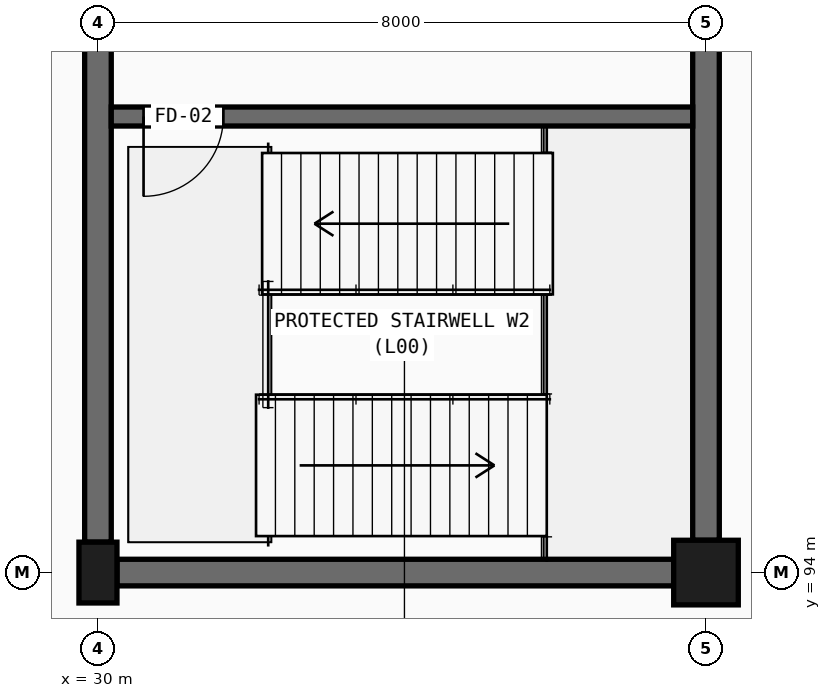
"""IFC4 building model, lengths in metres.
Left out: names, types, materials, properties, quantities, classifications, styles, units other than length and angle.
Written with IfcOpenShell. Run it as: python <this file> out.ifc"""

import sys

from ifc_helpers import new_model, si_unit, direction, frame, frame_2d, origin, origin_2d, place, context, subcontext, project, spatial, rectangle, extrude, element, fill, save


model = new_model("IFC4")
c1 = context("Model", 3, precision=1e-05, world=origin(), true_north=direction((0.0, 1.0)))
c2 = subcontext(c1, "Body", "Model", "MODEL_VIEW")
j1 = project(units=[si_unit("LENGTHUNIT", "METRE"), si_unit("PLANEANGLEUNIT", "RADIAN")], contexts=[c1])
p1 = place(None, origin())
s1 = spatial("IfcSite", under=j1, at=p1, CompositionType="ELEMENT")
p2 = place(p1, origin())
s2 = spatial("IfcBuilding", under=s1, at=p2, CompositionType="ELEMENT")
p3 = place(p2, origin())
s3 = spatial("IfcBuildingStorey", under=s2, at=p3, CompositionType="ELEMENT", Elevation=0.0)
p4 = place(p3, frame((30.0, 94.0, 0.0), z_axis=(0.0, 0.0, 1.0), x_axis=(1.0, 0.0, 0.0)))
e1 = element("IfcColumn", 1, at=p4, inside=s3, PredefinedType="COLUMN", context=c2, shape_type="SweptSolid", body=[
    extrude(rectangle(XDim=0.5, YDim=0.8, at=origin_2d()), origin(), (0.0, 0.0, 1.0), 5.4),
])
p5 = place(p3, frame((38.0, 94.0, 0.0), z_axis=(0.0, 0.0, 1.0), x_axis=(1.0, 0.0, 0.0)))
e2 = element("IfcColumn", 2, at=p5, inside=s3, PredefinedType="COLUMN", context=c2, shape_type="SweptSolid", body=[
    extrude(rectangle(XDim=0.85, YDim=0.85, at=origin_2d()), origin(), (0.0, 0.0, 1.0), 5.4),
])
p6 = place(p3, frame((30.25, 94.0, 0.0), z_axis=(0.0, 0.0, 1.0), x_axis=(1.0, 0.0, 0.0)))
e3 = element("IfcWall", 3, at=p6, inside=s3, PredefinedType="SHEAR", context=c2, shape_type="SweptSolid", body=[
    extrude(rectangle(XDim=7.325, YDim=0.35, at=frame_2d((3.663, 0.0))), origin(), (0.0, 0.0, 1.0), 5.18),
])
for number, where, z_axis, x_axis in (
    (4, (30.0, 94.4, 0.0), (0.0, 0.0, 1.0), (0.0, 1.0, 0.0)),
    (5, (38.0, 94.425, 0.0), (0.0, 0.0, 1.0), (0.0, 1.0, 0.0)),
):
    element("IfcWall", number, at=place(p3, frame(where, z_axis=z_axis, x_axis=x_axis)), inside=s3, PredefinedType="SHEAR", context=c2, shape_type="SweptSolid", body=[
        extrude(rectangle(XDim=7.175, YDim=0.35, at=frame_2d((3.587, 0.0))), origin(), (0.0, 0.0, 1.0), 5.18),
    ])
p7 = place(p3, frame((30.175, 100.0, 0.0), z_axis=(0.0, 0.0, 1.0), x_axis=(1.0, 0.0, 0.0)))
e6 = element("IfcWall", 6, at=p7, inside=s3, PredefinedType="SOLIDWALL", context=c2, shape_type="SweptSolid", body=[
    extrude(rectangle(XDim=7.65, YDim=0.25, at=frame_2d((3.825, 0.0))), origin(), (0.0, 0.0, 1.0), 5.18),
])
p8 = place(p7, frame((0.425, 0.0, 0.0)))
e7 = element("IfcOpeningElement", 7, at=p8, cuts=e6, PredefinedType="OPENING", context=c2, shape_type="SweptSolid", body=[
    extrude(rectangle(XDim=1.05, YDim=2.2, at=frame_2d((0.525, 1.1))), frame((0.0, 0.135, 0.0), z_axis=(0.0, -1.0, 0.0), x_axis=(1.0, 0.0, 0.0)), (0.0, 0.0, 1.0), 0.27),
])
p9 = place(p8, frame((1.05, 0.0, 0.0), z_axis=(0.0, 0.0, 1.0), x_axis=(-1.0, 0.0, 0.0)))
e8 = element("IfcDoor", 8, at=p9, inside=s3, OperationType="SINGLE_SWING_LEFT", PredefinedType="DOOR", context=c2, shape_type="SweptSolid", body=[
    extrude(rectangle(XDim=1.05, YDim=2.2, at=frame_2d((0.525, 1.1))), frame((0.0, 0.025, 0.0), z_axis=(0.0, -1.0, 0.0), x_axis=(1.0, 0.0, 0.0)), (0.0, 0.0, 1.0), 0.05),
])
fill(e7, e8)
save(model, sys.argv[1])
